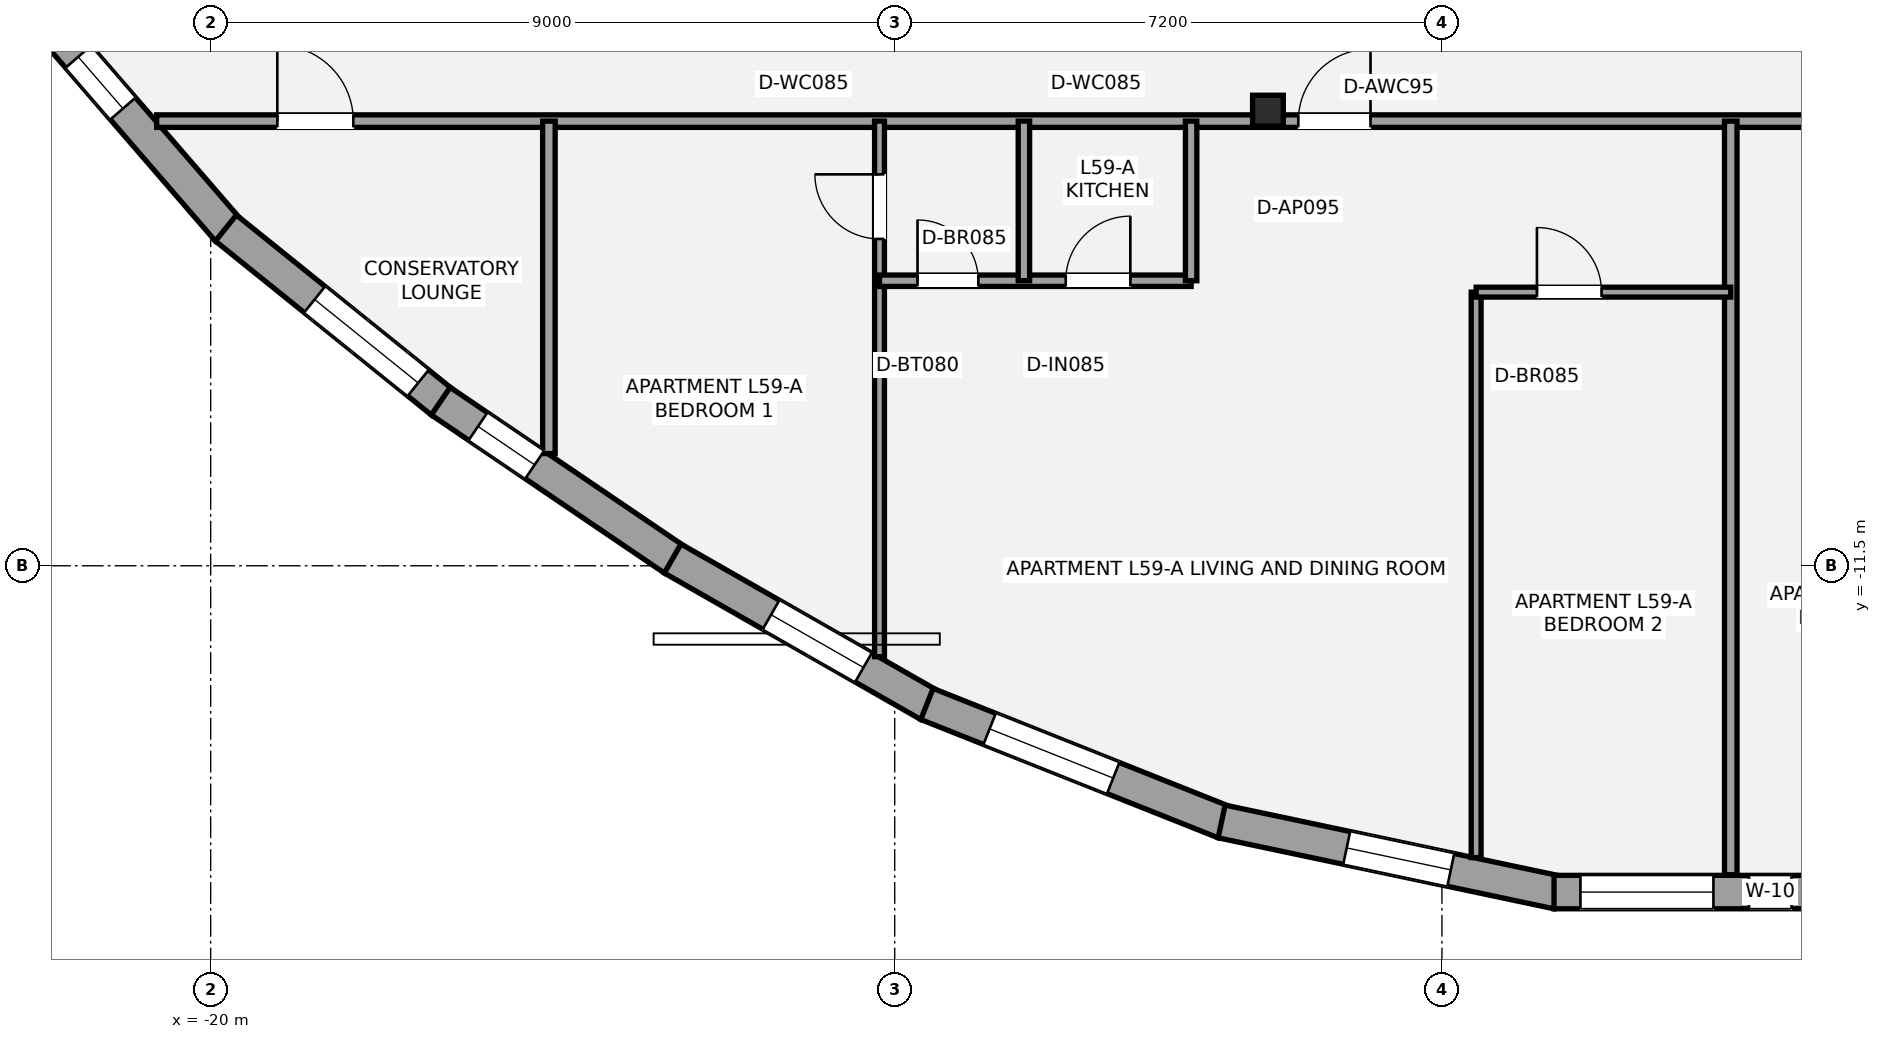
"""IFC4 building model, lengths in metres.
Left out: names, types, materials, properties, quantities, classifications, styles, units other than length and angle.
Written with IfcOpenShell. Run it as: python <this file> out.ifc"""

import sys

from ifc_helpers import new_model, si_unit, direction, frame, frame_2d, origin, origin_2d, place, context, subcontext, project, spatial, rectangle, i_section, extrude, element, fill, save


model = new_model("IFC4")
c1 = context("Model", 3, precision=1e-05, world=origin(), true_north=direction((0.0, 1.0)))
c2 = subcontext(c1, "Body", "Model", "MODEL_VIEW")
j1 = project(units=[si_unit("LENGTHUNIT", "METRE"), si_unit("PLANEANGLEUNIT", "RADIAN")], contexts=[c1])
p1 = place(None, origin())
s1 = spatial("IfcSite", under=j1, at=p1, CompositionType="ELEMENT")
p2 = place(p1, origin())
s2 = spatial("IfcBuilding", under=s1, at=p2, CompositionType="ELEMENT")
p3 = place(p2, frame((0.0, 0.0, 213.15)))
s3 = spatial("IfcBuildingStorey", under=s2, at=p3, CompositionType="ELEMENT", Elevation=213.15)
p4 = place(p3, frame((-6.09, -5.513, 0.0), z_axis=(0.0, 0.0, 1.0), x_axis=(1.0, 0.0, 0.0)))
e1 = element("IfcColumn", 1, at=p4, inside=s3, PredefinedType="COLUMN", context=c2, shape_type="SweptSolid", body=[
    extrude(i_section(OverallWidth=0.404, OverallDepth=0.407, WebThickness=0.027, FlangeThickness=0.044, at=origin_2d()), origin(), (0.0, 0.0, 1.0), 3.15),
])
p5 = place(p3, frame((-19.771, -7.084, 0.0), z_axis=(0.0, 0.0, 1.0), x_axis=(-0.654143325051, 0.75637061702, 0.0)))
e2 = element("IfcWall", 2, at=p5, inside=s3, PredefinedType="STANDARD", context=c2, shape_type="SweptSolid", body=[
    extrude(rectangle(XDim=3.508, YDim=0.44, at=frame_2d((1.754, 0.0))), origin(), (0.0, 0.0, 1.0), 2.336),
])
p6 = place(p5, frame((2.114, 0.0, 0.58)))
e3 = element("IfcOpeningElement", 3, at=p6, cuts=e2, PredefinedType="OPENING", context=c2, shape_type="SweptSolid", body=[
    extrude(rectangle(XDim=0.9, YDim=1.35, at=frame_2d((0.45, 0.675))), frame((0.0, 0.23, 0.0), z_axis=(0.0, -1.0, 0.0), x_axis=(1.0, 0.0, 0.0)), (0.0, 0.0, 1.0), 0.46),
])
p7 = place(p3, frame((-16.958, -9.345, 0.0), z_axis=(0.0, 0.0, 1.0), x_axis=(-0.778794775864, 0.627278803314, 0.0)))
e4 = element("IfcWall", 4, at=p7, inside=s3, PredefinedType="STANDARD", context=c2, shape_type="SweptSolid", body=[
    extrude(rectangle(XDim=3.648, YDim=0.44, at=frame_2d((1.824, 0.0))), origin(), (0.0, 0.0, 1.0), 2.336),
])
p8 = place(p7, frame((0.4, 0.0, 0.55)))
e5 = element("IfcOpeningElement", 5, at=p8, cuts=e4, PredefinedType="OPENING", context=c2, shape_type="SweptSolid", body=[
    extrude(rectangle(XDim=1.75, YDim=1.55, at=frame_2d((0.875, 0.775))), frame((0.0, 0.23, 0.0), z_axis=(0.0, -1.0, 0.0), x_axis=(1.0, 0.0, 0.0)), (0.0, 0.0, 1.0), 0.46),
])
p9 = place(p3, frame((-13.907, -11.413, 0.0), z_axis=(0.0, 0.0, 1.0), x_axis=(-0.827592777121, 0.561328954586, 0.0)))
e6 = element("IfcWall", 6, at=p9, inside=s3, PredefinedType="STANDARD", context=c2, shape_type="SweptSolid", body=[
    extrude(rectangle(XDim=3.704, YDim=0.44, at=frame_2d((1.852, 0.0))), origin(), (0.0, 0.0, 1.0), 2.336),
])
p10 = place(p9, frame((2.212, 0.0, 0.58)))
e7 = element("IfcOpeningElement", 7, at=p10, cuts=e6, PredefinedType="OPENING", context=c2, shape_type="SweptSolid", body=[
    extrude(rectangle(XDim=0.9, YDim=1.35, at=frame_2d((0.45, 0.675))), frame((0.0, 0.23, 0.0), z_axis=(0.0, -1.0, 0.0), x_axis=(1.0, 0.0, 0.0)), (0.0, 0.0, 1.0), 0.46),
])
p11 = place(p3, frame((-10.548, -13.332, 0.0), z_axis=(0.0, 0.0, 1.0), x_axis=(-0.868339797426, 0.495969753317, 0.0)))
e8 = element("IfcWall", 8, at=p11, inside=s3, PredefinedType="STANDARD", context=c2, shape_type="SweptSolid", body=[
    extrude(rectangle(XDim=3.885, YDim=0.44, at=frame_2d((1.943, 0.0))), origin(), (0.0, 0.0, 1.0), 2.336),
])
p12 = place(p11, frame((0.994, 0.0, 0.58)))
e9 = element("IfcOpeningElement", 9, at=p12, cuts=e8, PredefinedType="OPENING", context=c2, shape_type="SweptSolid", body=[
    extrude(rectangle(XDim=1.4, YDim=1.55, at=frame_2d((0.7, 0.775))), frame((0.0, 0.23, 0.0), z_axis=(0.0, -1.0, 0.0), x_axis=(1.0, 0.0, 0.0)), (0.0, 0.0, 1.0), 0.46),
])
p13 = place(p3, frame((-6.663, -14.875, 0.0), z_axis=(0.0, 0.0, 1.0), x_axis=(-0.929170765931, 0.369650764558, 0.0)))
e10 = element("IfcWall", 10, at=p13, inside=s3, PredefinedType="STANDARD", context=c2, shape_type="SweptSolid", body=[
    extrude(rectangle(XDim=4.211, YDim=0.44, at=frame_2d((2.105, 0.0))), origin(), (0.0, 0.0, 1.0), 2.336),
])
p14 = place(p13, frame((1.574, 0.0, 0.55)))
e11 = element("IfcOpeningElement", 11, at=p14, cuts=e10, PredefinedType="OPENING", context=c2, shape_type="SweptSolid", body=[
    extrude(rectangle(XDim=1.75, YDim=1.55, at=frame_2d((0.875, 0.775))), frame((0.0, 0.23, 0.0), z_axis=(0.0, -1.0, 0.0), x_axis=(1.0, 0.0, 0.0)), (0.0, 0.0, 1.0), 0.46),
])
p15 = place(p3, frame((-2.28, -15.798, 0.0), z_axis=(0.0, 0.0, 1.0), x_axis=(-0.97840271225, 0.206707843737, 0.0)))
e12 = element("IfcWall", 12, at=p15, inside=s3, PredefinedType="STANDARD", context=c2, shape_type="SweptSolid", body=[
    extrude(rectangle(XDim=4.517, YDim=0.44, at=frame_2d((2.258, 0.0))), origin(), (0.0, 0.0, 1.0), 2.336),
])
p16 = place(p15, frame((1.435, 0.0, 0.58)))
e13 = element("IfcOpeningElement", 13, at=p16, cuts=e12, PredefinedType="OPENING", context=c2, shape_type="SweptSolid", body=[
    extrude(rectangle(XDim=1.4, YDim=1.55, at=frame_2d((0.7, 0.775))), frame((0.0, 0.23, 0.0), z_axis=(0.0, -1.0, 0.0), x_axis=(1.0, 0.0, 0.0)), (0.0, 0.0, 1.0), 0.46),
])
p17 = place(p3, frame((2.325, -15.793, 0.0), z_axis=(0.0, 0.0, 1.0), x_axis=(-1.0, 0.0, 0.0)))
e14 = element("IfcWall", 14, at=p17, inside=s3, PredefinedType="STANDARD", context=c2, shape_type="SweptSolid", body=[
    extrude(rectangle(XDim=4.65, YDim=0.44, at=frame_2d((2.325, 0.0))), origin(), (0.0, 0.0, 1.0), 2.336),
])
p18 = place(p17, frame((2.553, 0.0, 0.55)))
e15 = element("IfcOpeningElement", 15, at=p18, cuts=e14, PredefinedType="OPENING", context=c2, shape_type="SweptSolid", body=[
    extrude(rectangle(XDim=1.75, YDim=1.55, at=frame_2d((0.875, 0.775))), frame((0.0, 0.23, 0.0), z_axis=(0.0, -1.0, 0.0), x_axis=(1.0, 0.0, 0.0)), (0.0, 0.0, 1.0), 0.46),
])
p19 = place(p17, frame((1.526, 0.0, 1.05)))
e16 = element("IfcOpeningElement", 16, at=p19, cuts=e14, PredefinedType="OPENING", context=c2, shape_type="SweptSolid", body=[
    extrude(rectangle(XDim=0.56, YDim=1.15, at=frame_2d((0.28, 0.575))), frame((0.0, 0.23, 0.0), z_axis=(0.0, -1.0, 0.0), x_axis=(1.0, 0.0, 0.0)), (0.0, 0.0, 1.0), 0.46),
])
p20 = place(p3, frame((-20.71, -5.65, 0.0), z_axis=(0.0, 0.0, 1.0), x_axis=(1.0, 0.0, 0.0)))
e17 = element("IfcWall", 17, at=p20, inside=s3, PredefinedType="PARTITIONING", context=c2, shape_type="SweptSolid", body=[
    extrude(rectangle(XDim=41.42, YDim=0.165, at=frame_2d((20.71, 0.0))), origin(), (0.0, 0.0, 1.0), 2.357),
])
p21 = place(p20, frame((1.587, 0.0, 0.0)))
e18 = element("IfcOpeningElement", 18, at=p21, cuts=e17, PredefinedType="OPENING", context=c2, shape_type="SweptSolid", body=[
    extrude(rectangle(XDim=1.0, YDim=2.15, at=frame_2d((0.5, 1.075))), frame((0.0, 0.093, 0.0), z_axis=(0.0, -1.0, 0.0), x_axis=(1.0, 0.0, 0.0)), (0.0, 0.0, 1.0), 0.185),
])
p22 = place(p20, frame((38.833, 0.0, 0.0)))
e19 = element("IfcOpeningElement", 19, at=p22, cuts=e17, PredefinedType="OPENING", context=c2, shape_type="SweptSolid", body=[
    extrude(rectangle(XDim=1.0, YDim=2.15, at=frame_2d((0.5, 1.075))), frame((0.0, 0.093, 0.0), z_axis=(0.0, -1.0, 0.0), x_axis=(1.0, 0.0, 0.0)), (0.0, 0.0, 1.0), 0.185),
])
p23 = place(p20, frame((15.02, 0.0, 0.0)))
e20 = element("IfcOpeningElement", 20, at=p23, cuts=e17, PredefinedType="OPENING", context=c2, shape_type="SweptSolid", body=[
    extrude(rectangle(XDim=0.95, YDim=2.15, at=frame_2d((0.475, 1.075))), frame((0.0, 0.093, 0.0), z_axis=(0.0, -1.0, 0.0), x_axis=(1.0, 0.0, 0.0)), (0.0, 0.0, 1.0), 0.185),
])
p24 = place(p20, frame((28.61, 0.0, 0.0)))
e21 = element("IfcOpeningElement", 21, at=p24, cuts=e17, PredefinedType="OPENING", context=c2, shape_type="SweptSolid", body=[
    extrude(rectangle(XDim=0.95, YDim=2.15, at=frame_2d((0.475, 1.075))), frame((0.0, 0.093, 0.0), z_axis=(0.0, -1.0, 0.0), x_axis=(1.0, 0.0, 0.0)), (0.0, 0.0, 1.0), 0.185),
])
p25 = place(p3, frame((-15.55, -10.024, 0.0), z_axis=(0.0, 0.0, 1.0), x_axis=(0.0, 1.0, 0.0)))
e22 = element("IfcWall", 22, at=p25, inside=s3, PredefinedType="PARTITIONING", context=c2, shape_type="SweptSolid", body=[
    extrude(rectangle(XDim=4.374, YDim=0.165, at=frame_2d((2.187, 0.0))), origin(), (0.0, 0.0, 1.0), 2.423),
])
p26 = place(p3, frame((0.0, -15.565, 0.0), z_axis=(0.0, 0.0, 1.0), x_axis=(0.0, 1.0, 0.0)))
e23 = element("IfcWall", 23, at=p26, inside=s3, PredefinedType="PARTITIONING", context=c2, shape_type="SweptSolid", body=[
    extrude(rectangle(XDim=9.915, YDim=0.165, at=frame_2d((4.958, 0.0))), origin(), (0.0, 0.0, 1.0), 2.423),
])
p27 = place(p3, frame((-11.2, -12.696, 0.0), z_axis=(0.0, 0.0, 1.0), x_axis=(0.0, 1.0, 0.0)))
e24 = element("IfcWall", 24, at=p27, inside=s3, PredefinedType="PARTITIONING", context=c2, shape_type="SweptSolid", body=[
    extrude(rectangle(XDim=7.046, YDim=0.13, at=frame_2d((3.523, 0.0))), origin(), (0.0, 0.0, 1.0), 2.423),
])
p28 = place(p27, frame((5.496, 0.0, 0.0)))
e25 = element("IfcOpeningElement", 25, at=p28, cuts=e24, PredefinedType="OPENING", context=c2, shape_type="SweptSolid", body=[
    extrude(rectangle(XDim=0.85, YDim=2.1, at=frame_2d((0.425, 1.05))), frame((0.0, 0.075, 0.0), z_axis=(0.0, -1.0, 0.0), x_axis=(1.0, 0.0, 0.0)), (0.0, 0.0, 1.0), 0.15),
])
p29 = place(p3, frame((-11.2, -7.75, 0.0), z_axis=(0.0, 0.0, 1.0), x_axis=(1.0, 0.0, 0.0)))
e26 = element("IfcWall", 26, at=p29, inside=s3, PredefinedType="PLUMBINGWALL", context=c2, shape_type="SweptSolid", body=[
    extrude(rectangle(XDim=4.1, YDim=0.15, at=frame_2d((2.05, 0.0))), origin(), (0.0, 0.0, 1.0), 2.423),
])
p30 = place(p29, frame((0.5, 0.0, 0.0)))
e27 = element("IfcOpeningElement", 27, at=p30, cuts=e26, PredefinedType="OPENING", context=c2, shape_type="SweptSolid", body=[
    extrude(rectangle(XDim=0.8, YDim=2.1, at=frame_2d((0.4, 1.05))), frame((0.0, 0.085, 0.0), z_axis=(0.0, -1.0, 0.0), x_axis=(1.0, 0.0, 0.0)), (0.0, 0.0, 1.0), 0.17),
])
p31 = place(p29, frame((2.45, 0.0, 0.0)))
e28 = element("IfcOpeningElement", 28, at=p31, cuts=e26, PredefinedType="OPENING", context=c2, shape_type="SweptSolid", body=[
    extrude(rectangle(XDim=0.85, YDim=2.1, at=frame_2d((0.425, 1.05))), frame((0.0, 0.085, 0.0), z_axis=(0.0, -1.0, 0.0), x_axis=(1.0, 0.0, 0.0)), (0.0, 0.0, 1.0), 0.17),
])
p32 = place(p3, frame((-9.3, -7.75, 0.0), z_axis=(0.0, 0.0, 1.0), x_axis=(0.0, 1.0, 0.0)))
e29 = element("IfcWall", 29, at=p32, inside=s3, PredefinedType="PLUMBINGWALL", context=c2, shape_type="SweptSolid", body=[
    extrude(rectangle(XDim=2.1, YDim=0.15, at=frame_2d((1.05, 0.0))), origin(), (0.0, 0.0, 1.0), 2.97),
])
p33 = place(p3, frame((-7.1, -7.75, 0.0), z_axis=(0.0, 0.0, 1.0), x_axis=(0.0, 1.0, 0.0)))
e30 = element("IfcWall", 30, at=p33, inside=s3, PredefinedType="PLUMBINGWALL", context=c2, shape_type="SweptSolid", body=[
    extrude(rectangle(XDim=2.1, YDim=0.15, at=frame_2d((1.05, 0.0))), origin(), (0.0, 0.0, 1.0), 2.423),
])
p34 = place(p3, frame((-3.35, -15.338, 0.0), z_axis=(0.0, 0.0, 1.0), x_axis=(0.0, 1.0, 0.0)))
e31 = element("IfcWall", 31, at=p34, inside=s3, PredefinedType="PARTITIONING", context=c2, shape_type="SweptSolid", body=[
    extrude(rectangle(XDim=7.438, YDim=0.13, at=frame_2d((3.719, 0.0))), origin(), (0.0, 0.0, 1.0), 2.423),
])
p35 = place(p3, frame((-3.35, -7.9, 0.0), z_axis=(0.0, 0.0, 1.0), x_axis=(1.0, 0.0, 0.0)))
e32 = element("IfcWall", 32, at=p35, inside=s3, PredefinedType="PARTITIONING", context=c2, shape_type="SweptSolid", body=[
    extrude(rectangle(XDim=3.35, YDim=0.13, at=frame_2d((1.675, 0.0))), origin(), (0.0, 0.0, 1.0), 2.423),
])
p36 = place(p35, frame((0.8, 0.0, 0.0)))
e33 = element("IfcOpeningElement", 33, at=p36, cuts=e32, PredefinedType="OPENING", context=c2, shape_type="SweptSolid", body=[
    extrude(rectangle(XDim=0.85, YDim=2.1, at=frame_2d((0.425, 1.05))), frame((0.0, 0.075, 0.0), z_axis=(0.0, -1.0, 0.0), x_axis=(1.0, 0.0, 0.0)), (0.0, 0.0, 1.0), 0.15),
])
p37 = place(p6, origin())
e34 = element("IfcWindow", 34, at=p37, inside=s3, PartitioningType="SINGLE_PANEL", PredefinedType="WINDOW", context=c2, shape_type="SweptSolid", body=[
    extrude(rectangle(XDim=0.9, YDim=1.35, at=frame_2d((0.45, 0.675))), frame((0.0, -0.01, 0.0), z_axis=(0.0, -1.0, 0.0), x_axis=(1.0, 0.0, 0.0)), (0.0, 0.0, 1.0), 0.06),
])
fill(e3, e34)
p38 = place(p8, origin())
e35 = element("IfcWindow", 35, at=p38, inside=s3, PartitioningType="SINGLE_PANEL", PredefinedType="WINDOW", context=c2, shape_type="SweptSolid", body=[
    extrude(rectangle(XDim=1.75, YDim=1.55, at=frame_2d((0.875, 0.775))), frame((0.0, -0.01, 0.0), z_axis=(0.0, -1.0, 0.0), x_axis=(1.0, 0.0, 0.0)), (0.0, 0.0, 1.0), 0.06),
])
fill(e5, e35)
p39 = place(p10, origin())
e36 = element("IfcWindow", 36, at=p39, inside=s3, PartitioningType="SINGLE_PANEL", PredefinedType="WINDOW", context=c2, shape_type="SweptSolid", body=[
    extrude(rectangle(XDim=0.9, YDim=1.35, at=frame_2d((0.45, 0.675))), frame((0.0, -0.01, 0.0), z_axis=(0.0, -1.0, 0.0), x_axis=(1.0, 0.0, 0.0)), (0.0, 0.0, 1.0), 0.06),
])
fill(e7, e36)
p40 = place(p12, origin())
e37 = element("IfcWindow", 37, at=p40, inside=s3, PartitioningType="SINGLE_PANEL", PredefinedType="WINDOW", context=c2, shape_type="SweptSolid", body=[
    extrude(rectangle(XDim=1.4, YDim=1.55, at=frame_2d((0.7, 0.775))), frame((0.0, -0.01, 0.0), z_axis=(0.0, -1.0, 0.0), x_axis=(1.0, 0.0, 0.0)), (0.0, 0.0, 1.0), 0.06),
])
fill(e9, e37)
p41 = place(p14, origin())
e38 = element("IfcWindow", 38, at=p41, inside=s3, PartitioningType="SINGLE_PANEL", PredefinedType="WINDOW", context=c2, shape_type="SweptSolid", body=[
    extrude(rectangle(XDim=1.75, YDim=1.55, at=frame_2d((0.875, 0.775))), frame((0.0, -0.01, 0.0), z_axis=(0.0, -1.0, 0.0), x_axis=(1.0, 0.0, 0.0)), (0.0, 0.0, 1.0), 0.06),
])
fill(e11, e38)
p42 = place(p16, origin())
e39 = element("IfcWindow", 39, at=p42, inside=s3, PartitioningType="SINGLE_PANEL", PredefinedType="WINDOW", context=c2, shape_type="SweptSolid", body=[
    extrude(rectangle(XDim=1.4, YDim=1.55, at=frame_2d((0.7, 0.775))), frame((0.0, -0.01, 0.0), z_axis=(0.0, -1.0, 0.0), x_axis=(1.0, 0.0, 0.0)), (0.0, 0.0, 1.0), 0.06),
])
fill(e13, e39)
p43 = place(p18, origin())
e40 = element("IfcWindow", 40, at=p43, inside=s3, PartitioningType="SINGLE_PANEL", PredefinedType="WINDOW", context=c2, shape_type="SweptSolid", body=[
    extrude(rectangle(XDim=1.75, YDim=1.55, at=frame_2d((0.875, 0.775))), frame((0.0, -0.01, 0.0), z_axis=(0.0, -1.0, 0.0), x_axis=(1.0, 0.0, 0.0)), (0.0, 0.0, 1.0), 0.06),
])
fill(e15, e40)
p44 = place(p19, origin())
e41 = element("IfcWindow", 41, at=p44, inside=s3, PartitioningType="SINGLE_PANEL", PredefinedType="WINDOW", context=c2, shape_type="SweptSolid", body=[
    extrude(rectangle(XDim=0.56, YDim=1.15, at=frame_2d((0.28, 0.575))), frame((0.0, -0.01, 0.0), z_axis=(0.0, -1.0, 0.0), x_axis=(1.0, 0.0, 0.0)), (0.0, 0.0, 1.0), 0.06),
])
fill(e16, e41)
p45 = place(p21, origin())
e42 = element("IfcDoor", 42, at=p45, inside=s3, OperationType="SINGLE_SWING_LEFT", PredefinedType="DOOR", context=c2, shape_type="SweptSolid", body=[
    extrude(rectangle(XDim=1.0, YDim=2.15, at=frame_2d((0.5, 1.075))), frame((0.0, 0.025, 0.0), z_axis=(0.0, -1.0, 0.0), x_axis=(1.0, 0.0, 0.0)), (0.0, 0.0, 1.0), 0.05),
])
fill(e18, e42)
p46 = place(p28, origin())
e43 = element("IfcDoor", 43, at=p46, inside=s3, OperationType="SINGLE_SWING_RIGHT", PredefinedType="DOOR", context=c2, shape_type="SweptSolid", body=[
    extrude(rectangle(XDim=0.85, YDim=2.1, at=frame_2d((0.425, 1.05))), frame((0.0, 0.025, 0.0), z_axis=(0.0, -1.0, 0.0), x_axis=(1.0, 0.0, 0.0)), (0.0, 0.0, 1.0), 0.05),
])
fill(e25, e43)
p47 = place(p30, origin())
e44 = element("IfcDoor", 44, at=p47, inside=s3, OperationType="SINGLE_SWING_LEFT", PredefinedType="DOOR", context=c2, shape_type="SweptSolid", body=[
    extrude(rectangle(XDim=0.8, YDim=2.1, at=frame_2d((0.4, 1.05))), frame((0.0, 0.025, 0.0), z_axis=(0.0, -1.0, 0.0), x_axis=(1.0, 0.0, 0.0)), (0.0, 0.0, 1.0), 0.05),
])
fill(e27, e44)
p48 = place(p31, origin())
e45 = element("IfcDoor", 45, at=p48, inside=s3, OperationType="SINGLE_SWING_RIGHT", PredefinedType="DOOR", context=c2, shape_type="SweptSolid", body=[
    extrude(rectangle(XDim=0.85, YDim=2.1, at=frame_2d((0.425, 1.05))), frame((0.0, 0.025, 0.0), z_axis=(0.0, -1.0, 0.0), x_axis=(1.0, 0.0, 0.0)), (0.0, 0.0, 1.0), 0.05),
])
fill(e28, e45)
p49 = place(p23, origin())
e46 = element("IfcDoor", 46, at=p49, inside=s3, OperationType="SINGLE_SWING_RIGHT", PredefinedType="DOOR", context=c2, shape_type="SweptSolid", body=[
    extrude(rectangle(XDim=0.95, YDim=2.15, at=frame_2d((0.475, 1.075))), frame((0.0, 0.025, 0.0), z_axis=(0.0, -1.0, 0.0), x_axis=(1.0, 0.0, 0.0)), (0.0, 0.0, 1.0), 0.05),
])
fill(e20, e46)
p50 = place(p36, origin())
e47 = element("IfcDoor", 47, at=p50, inside=s3, OperationType="SINGLE_SWING_LEFT", PredefinedType="DOOR", context=c2, shape_type="SweptSolid", body=[
    extrude(rectangle(XDim=0.85, YDim=2.1, at=frame_2d((0.425, 1.05))), frame((0.0, 0.025, 0.0), z_axis=(0.0, -1.0, 0.0), x_axis=(1.0, 0.0, 0.0)), (0.0, 0.0, 1.0), 0.05),
])
fill(e33, e47)
save(model, sys.argv[1])
